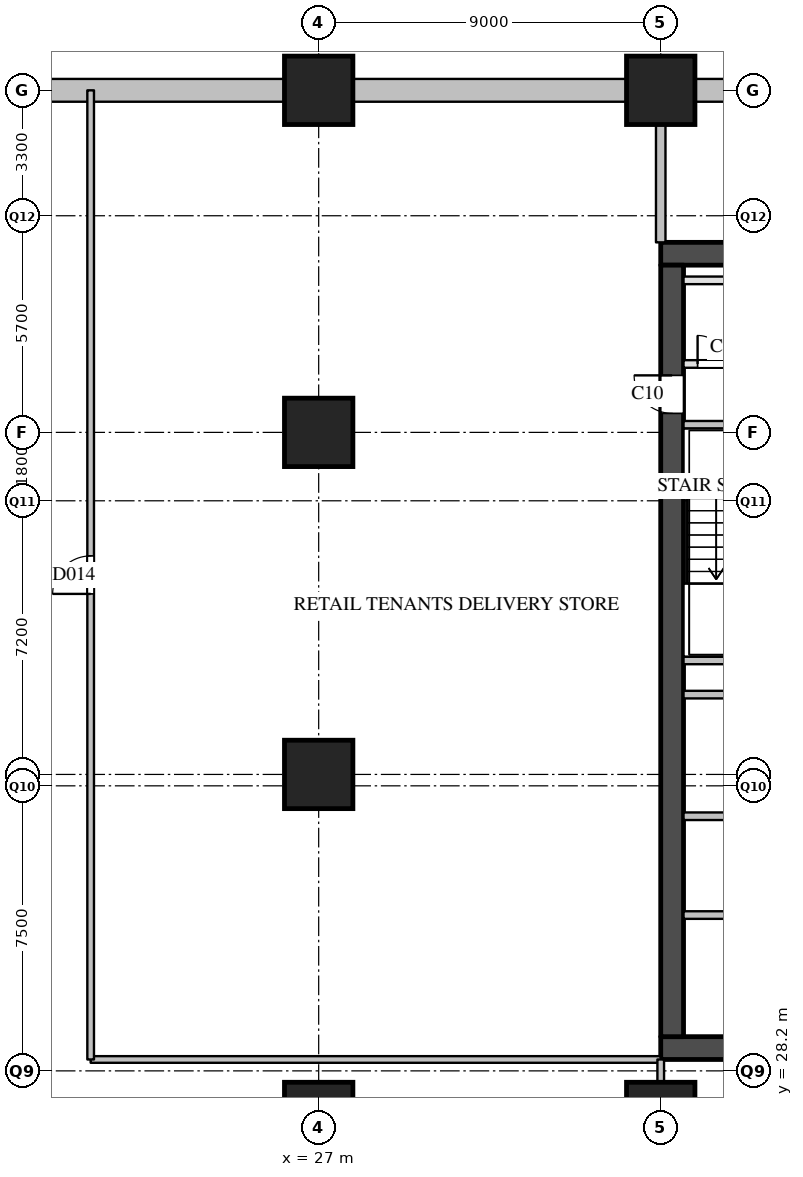
"""IFC4 building model, lengths in metres.
Left out: names, types, materials, properties, quantities, classifications, styles, units other than length and angle.
Written with IfcOpenShell. Run it as: python <this file> out.ifc"""

import sys

from ifc_helpers import new_model, si_unit, direction, frame, frame_2d, origin, origin_2d, place, context, subcontext, project, spatial, rectangle, extrude, element, fill, save


model = new_model("IFC4")
c1 = context("Model", 3, precision=1e-05, world=origin(), true_north=direction((0.0, 1.0)))
c2 = subcontext(c1, "Body", "Model", "MODEL_VIEW")
j1 = project(units=[si_unit("LENGTHUNIT", "METRE"), si_unit("PLANEANGLEUNIT", "RADIAN")], contexts=[c1])
p1 = place(None, origin())
s1 = spatial("IfcSite", under=j1, at=p1, CompositionType="ELEMENT")
p2 = place(p1, origin())
s2 = spatial("IfcBuilding", under=s1, at=p2, CompositionType="ELEMENT")
p3 = place(p2, frame((0.0, 0.0, -6.0)))
s3 = spatial("IfcBuildingStorey", under=s2, at=p3, CompositionType="ELEMENT", Elevation=-6.0)
for number, where, z_axis, x_axis in (
    (1, (27.0, 27.0, 0.0), (0.0, 0.0, 1.0), (1.0, 0.0, 0.0)),
    (2, (27.0, 36.0, 0.0), (0.0, 0.0, 1.0), (1.0, 0.0, 0.0)),
    (3, (27.0, 45.0, 0.0), (0.0, 0.0, 1.0), (1.0, 0.0, 0.0)),
    (4, (27.0, 54.0, 0.0), (0.0, 0.0, 1.0), (1.0, 0.0, 0.0)),
    (5, (36.0, 27.0, 0.0), (0.0, 0.0, 1.0), (1.0, 0.0, 0.0)),
    (6, (36.0, 54.0, 0.0), (0.0, 0.0, 1.0), (1.0, 0.0, 0.0)),
):
    element("IfcColumn", number, at=place(p3, frame(where, z_axis=z_axis, x_axis=x_axis)), inside=s3, PredefinedType="COLUMN", context=c2, shape_type="SweptSolid", body=[
        extrude(rectangle(XDim=1.8, YDim=1.8, at=origin_2d()), origin(), (0.0, 0.0, 1.0), 6.0),
    ])
for number, where, z_axis, x_axis in (
    (7, (44.1, 54.0, 0.0), (0.0, 0.0, 1.0), (-1.0, 0.0, 0.0)),
    (8, (35.1, 54.0, 0.0), (0.0, 0.0, 1.0), (-1.0, 0.0, 0.0)),
    (9, (26.1, 54.0, 0.0), (0.0, 0.0, 1.0), (-1.0, 0.0, 0.0)),
):
    element("IfcWall", number, at=place(p3, frame(where, z_axis=z_axis, x_axis=x_axis)), inside=s3, PredefinedType="SOLIDWALL", context=c2, shape_type="SweptSolid", body=[
        extrude(rectangle(XDim=7.2, YDim=0.6, at=frame_2d((3.6, 0.0))), origin(), (0.0, 0.0, 1.0), 5.59),
    ])
for number, where, z_axis, x_axis in (
    (10, (36.0, 28.8, 0.0), (0.0, 0.0, 1.0), (1.0, 0.0, 0.0)),
    (11, (36.0, 49.7, 0.0), (0.0, 0.0, 1.0), (1.0, 0.0, 0.0)),
):
    element("IfcWall", number, at=place(p3, frame(where, z_axis=z_axis, x_axis=x_axis)), inside=s3, PredefinedType="SHEAR", context=c2, shape_type="SweptSolid", body=[
        extrude(rectangle(XDim=12.4, YDim=0.6, at=frame_2d((6.2, 0.0))), origin(), (0.0, 0.0, 1.0), 5.59),
    ])
p4 = place(p3, frame((36.3, 29.1, 0.0), z_axis=(0.0, 0.0, 1.0), x_axis=(0.0, 1.0, 0.0)))
e12 = element("IfcWall", 12, at=p4, inside=s3, PredefinedType="SHEAR", context=c2, shape_type="SweptSolid", body=[
    extrude(rectangle(XDim=20.3, YDim=0.6, at=frame_2d((10.15, 0.0))), origin(), (0.0, 0.0, 1.0), 5.59),
])
p5 = place(p4, frame((16.4, 0.0, 0.0)))
e13 = element("IfcOpeningElement", 13, at=p5, cuts=e12, PredefinedType="OPENING", context=c2, shape_type="SweptSolid", body=[
    extrude(rectangle(XDim=1.0, YDim=2.1, at=frame_2d((0.5, 1.05))), frame((0.0, 0.31, 0.0), z_axis=(0.0, -1.0, 0.0), x_axis=(1.0, 0.0, 0.0)), (0.0, 0.0, 1.0), 0.62),
])
p6 = place(p3, frame((36.6, 32.3, 0.0), z_axis=(0.0, 0.0, 1.0), x_axis=(1.0, 0.0, 0.0)))
e14 = element("IfcWall", 14, at=p6, inside=s3, PredefinedType="SOLIDWALL", context=c2, shape_type="SweptSolid", body=[
    extrude(rectangle(XDim=11.2, YDim=0.2, at=frame_2d((5.6, 0.0))), origin(), (0.0, 0.0, 1.0), 5.59),
])
for number, where, z_axis, x_axis in (
    (15, (36.6, 34.9, 0.0), (0.0, 0.0, 1.0), (1.0, 0.0, 0.0)),
    (16, (36.6, 38.1, 0.0), (0.0, 0.0, 1.0), (1.0, 0.0, 0.0)),
):
    element("IfcWall", number, at=place(p3, frame(where, z_axis=z_axis, x_axis=x_axis)), inside=s3, PredefinedType="SOLIDWALL", context=c2, shape_type="SweptSolid", body=[
        extrude(rectangle(XDim=6.3, YDim=0.2, at=frame_2d((3.15, 0.0))), origin(), (0.0, 0.0, 1.0), 5.59),
    ])
p7 = place(p3, frame((36.6, 39.0, 0.0), z_axis=(0.0, 0.0, 1.0), x_axis=(1.0, 0.0, 0.0)))
e17 = element("IfcWall", 17, at=p7, inside=s3, PredefinedType="SOLIDWALL", context=c2, shape_type="SweptSolid", body=[
    extrude(rectangle(XDim=3.25, YDim=0.2, at=frame_2d((1.625, 0.0))), origin(), (0.0, 0.0, 1.0), 5.59),
])
p8 = place(p3, frame((36.6, 45.2, 0.0), z_axis=(0.0, 0.0, 1.0), x_axis=(1.0, 0.0, 0.0)))
e18 = element("IfcWall", 18, at=p8, inside=s3, PredefinedType="SOLIDWALL", context=c2, shape_type="SweptSolid", body=[
    extrude(rectangle(XDim=3.25, YDim=0.2, at=frame_2d((1.625, 0.0))), origin(), (0.0, 0.0, 1.0), 5.59),
])
p9 = place(p8, frame((1.125, 0.0, 0.0)))
e19 = element("IfcOpeningElement", 19, at=p9, cuts=e18, PredefinedType="OPENING", context=c2, shape_type="SweptSolid", body=[
    extrude(rectangle(XDim=1.1, YDim=2.1, at=frame_2d((0.55, 1.05))), frame((0.0, 0.11, 0.0), z_axis=(0.0, -1.0, 0.0), x_axis=(1.0, 0.0, 0.0)), (0.0, 0.0, 1.0), 0.22),
])
p10 = place(p3, frame((36.6, 46.8, 0.0), z_axis=(0.0, 0.0, 1.0), x_axis=(1.0, 0.0, 0.0)))
e20 = element("IfcWall", 20, at=p10, inside=s3, PredefinedType="PARTITIONING", context=c2, shape_type="SweptSolid", body=[
    extrude(rectangle(XDim=11.2, YDim=0.2, at=frame_2d((5.6, 0.0))), origin(), (0.0, 0.0, 1.0), 5.59),
])
p11 = place(p10, frame((0.37, 0.0, 0.0)))
e21 = element("IfcOpeningElement", 21, at=p11, cuts=e20, PredefinedType="OPENING", context=c2, shape_type="SweptSolid", body=[
    extrude(rectangle(XDim=1.5, YDim=2.1, at=frame_2d((0.75, 1.05))), frame((0.0, 0.11, 0.0), z_axis=(0.0, -1.0, 0.0), x_axis=(1.0, 0.0, 0.0)), (0.0, 0.0, 1.0), 0.22),
])
p12 = place(p10, frame((4.29, 0.0, 0.0)))
e22 = element("IfcOpeningElement", 22, at=p12, cuts=e20, PredefinedType="OPENING", context=c2, shape_type="SweptSolid", body=[
    extrude(rectangle(XDim=1.5, YDim=2.1, at=frame_2d((0.75, 1.05))), frame((0.0, 0.11, 0.0), z_axis=(0.0, -1.0, 0.0), x_axis=(1.0, 0.0, 0.0)), (0.0, 0.0, 1.0), 0.22),
])
p13 = place(p10, frame((8.77, 0.0, 0.0)))
e23 = element("IfcOpeningElement", 23, at=p13, cuts=e20, PredefinedType="OPENING", context=c2, shape_type="SweptSolid", body=[
    extrude(rectangle(XDim=1.5, YDim=2.1, at=frame_2d((0.75, 1.05))), frame((0.0, 0.11, 0.0), z_axis=(0.0, -1.0, 0.0), x_axis=(1.0, 0.0, 0.0)), (0.0, 0.0, 1.0), 0.22),
])
p14 = place(p3, frame((36.6, 49.0, 0.0), z_axis=(0.0, 0.0, 1.0), x_axis=(1.0, 0.0, 0.0)))
e24 = element("IfcWall", 24, at=p14, inside=s3, PredefinedType="PARTITIONING", context=c2, shape_type="SweptSolid", body=[
    extrude(rectangle(XDim=11.2, YDim=0.2, at=frame_2d((5.6, 0.0))), origin(), (0.0, 0.0, 1.0), 5.59),
])
p15 = place(p3, frame((21.0, 28.5, 0.0), z_axis=(0.0, 0.0, 1.0), x_axis=(1.0, 0.0, 0.0)))
e25 = element("IfcWall", 25, at=p15, inside=s3, PredefinedType="PARTITIONING", context=c2, shape_type="SweptSolid", body=[
    extrude(rectangle(XDim=15.0, YDim=0.175, at=frame_2d((7.5, 0.0))), origin(), (0.0, 0.0, 1.0), 5.59),
])
p16 = place(p3, frame((21.0, 28.5, 0.0), z_axis=(0.0, 0.0, 1.0), x_axis=(0.0, 1.0, 0.0)))
e26 = element("IfcWall", 26, at=p16, inside=s3, PredefinedType="PARTITIONING", context=c2, shape_type="SweptSolid", body=[
    extrude(rectangle(XDim=25.5, YDim=0.175, at=frame_2d((12.75, 0.0))), origin(), (0.0, 0.0, 1.0), 5.59),
])
p17 = place(p16, frame((12.25, 0.0, 0.0)))
e27 = element("IfcOpeningElement", 27, at=p17, cuts=e26, PredefinedType="OPENING", context=c2, shape_type="SweptSolid", body=[
    extrude(rectangle(XDim=1.0, YDim=2.1, at=frame_2d((0.5, 1.05))), frame((0.0, 0.097, 0.0), z_axis=(0.0, -1.0, 0.0), x_axis=(1.0, 0.0, 0.0)), (0.0, 0.0, 1.0), 0.195),
])
p18 = place(p3, frame((36.0, 22.5, 0.0), z_axis=(0.0, 0.0, 1.0), x_axis=(0.0, 1.0, 0.0)))
e28 = element("IfcWall", 28, at=p18, inside=s3, PredefinedType="PARTITIONING", context=c2, shape_type="SweptSolid", body=[
    extrude(rectangle(XDim=6.0, YDim=0.175, at=frame_2d((3.0, 0.0))), origin(), (0.0, 0.0, 1.0), 5.59),
])
p19 = place(p3, frame((36.0, 50.0, 0.0), z_axis=(0.0, 0.0, 1.0), x_axis=(0.0, 1.0, 0.0)))
e29 = element("IfcWall", 29, at=p19, inside=s3, PredefinedType="PARTITIONING", context=c2, shape_type="SweptSolid", body=[
    extrude(rectangle(XDim=4.0, YDim=0.25, at=frame_2d((2.0, 0.0))), origin(), (0.0, 0.0, 1.0), 5.59),
])
p20 = place(p5, origin())
e30 = element("IfcDoor", 30, at=p20, inside=s3, OperationType="SINGLE_SWING_RIGHT", PredefinedType="DOOR", context=c2, shape_type="SweptSolid", body=[
    extrude(rectangle(XDim=1.0, YDim=2.1, at=frame_2d((0.5, 1.05))), frame((0.0, 0.025, 0.0), z_axis=(0.0, -1.0, 0.0), x_axis=(1.0, 0.0, 0.0)), (0.0, 0.0, 1.0), 0.05),
])
fill(e13, e30)
p21 = place(p11, origin())
e31 = element("IfcDoor", 31, at=p21, inside=s3, OperationType="DOUBLE_DOOR_SINGLE_SWING", PredefinedType="DOOR", context=c2, shape_type="SweptSolid", body=[
    extrude(rectangle(XDim=1.5, YDim=2.1, at=frame_2d((0.75, 1.05))), frame((0.0, 0.025, 0.0), z_axis=(0.0, -1.0, 0.0), x_axis=(1.0, 0.0, 0.0)), (0.0, 0.0, 1.0), 0.05),
])
fill(e21, e31)
p22 = place(p17, origin())
e32 = element("IfcDoor", 32, at=p22, inside=s3, OperationType="SINGLE_SWING_LEFT", PredefinedType="DOOR", context=c2, shape_type="SweptSolid", body=[
    extrude(rectangle(XDim=1.0, YDim=2.1, at=frame_2d((0.5, 1.05))), frame((0.0, 0.025, 0.0), z_axis=(0.0, -1.0, 0.0), x_axis=(1.0, 0.0, 0.0)), (0.0, 0.0, 1.0), 0.05),
])
fill(e27, e32)
save(model, sys.argv[1])
